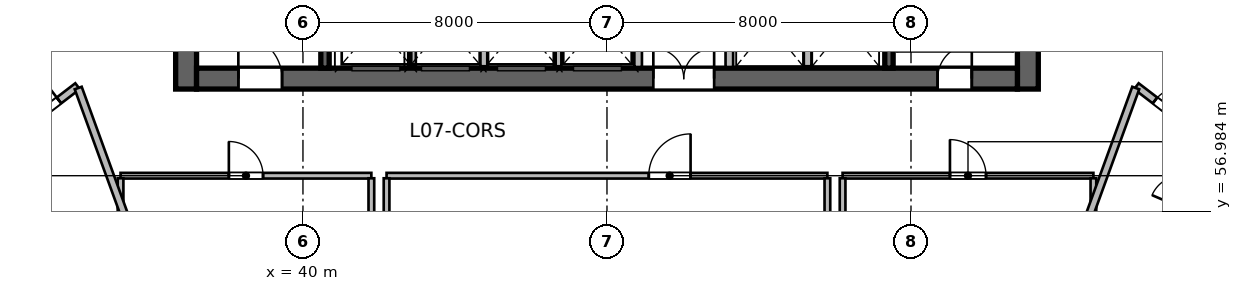
"""IFC4 building model, lengths in metres.
Left out: names, types, materials, properties, quantities, classifications, styles, units other than length and angle.
Written with IfcOpenShell. Run it as: python <this file> out.ifc"""

import sys

from ifc_helpers import new_model, si_unit, direction, frame, frame_2d, origin, place, context, subcontext, project, spatial, rectangle, extrude, source, transform, mapped, element, fill, save


model = new_model("IFC4")
c1 = context("Model", 3, precision=1e-05, world=origin(), true_north=direction((0.0, 1.0)))
c2 = subcontext(c1, "Body", "Model", "MODEL_VIEW")
j1 = project(units=[si_unit("LENGTHUNIT", "METRE"), si_unit("PLANEANGLEUNIT", "RADIAN")], contexts=[c1])
p1 = place(None, origin())
s1 = spatial("IfcSite", under=j1, at=p1, CompositionType="ELEMENT")
p2 = place(p1, origin())
s2 = spatial("IfcBuilding", under=s1, at=p2, CompositionType="ELEMENT")
p3 = place(p2, frame((0.0, 0.0, 39.0)))
s3 = spatial("IfcBuildingStorey", under=s2, at=p3, CompositionType="ELEMENT", Elevation=39.0)
m1 = source(origin(), c2, "Body", "SweptSolid", [
    extrude(rectangle(XDim=12.0, YDim=0.55, at=frame_2d((6.0, 0.0))), origin(), (0.0, 0.0, 1.0), 3.6),
])
for number, where, z_axis, x_axis in (
    (1, (36.925, 60.2, 0.0), (0.0, 0.0, 1.0), (0.0, 1.0, 0.0)),
    (2, (59.075, 60.2, 0.0), (0.0, 0.0, 1.0), (0.0, 1.0, 0.0)),
):
    element("IfcWall", number, at=place(p3, frame(where, z_axis=z_axis, x_axis=x_axis)), inside=s3, PredefinedType="SHEAR", context=c2, shape_type="MappedRepresentation", body=[
        mapped(m1, transform((0.0, 0.0, 0.0), scale=1.0)),
    ])
m2 = source(origin(), c2, "Body", "SweptSolid", [
    extrude(rectangle(XDim=21.6, YDim=0.55, at=frame_2d((10.8, 0.0))), origin(), (0.0, 0.0, 1.0), 3.6),
])
p4 = place(p3, frame((37.2, 60.475, 0.0), z_axis=(0.0, 0.0, 1.0), x_axis=(1.0, 0.0, 0.0)))
e3 = element("IfcWall", 3, at=p4, inside=s3, PredefinedType="SHEAR", context=c2, shape_type="MappedRepresentation", body=[
    mapped(m2, transform((0.0, 0.0, 0.0), scale=1.0)),
])
p5 = place(p4, frame((1.1, 0.0, 0.0)))
e4 = element("IfcOpeningElement", 4, at=p5, cuts=e3, PredefinedType="OPENING", context=c2, shape_type="SweptSolid", body=[
    extrude(rectangle(XDim=1.15, YDim=2.15, at=frame_2d((0.575, 1.075))), frame((0.0, 0.285, 0.0), z_axis=(0.0, -1.0, 0.0), x_axis=(1.0, 0.0, 0.0)), (0.0, 0.0, 1.0), 0.57),
])
p6 = place(p4, frame((19.5, 0.0, 0.0)))
e5 = element("IfcOpeningElement", 5, at=p6, cuts=e3, PredefinedType="OPENING", context=c2, shape_type="SweptSolid", body=[
    extrude(rectangle(XDim=0.9, YDim=2.1, at=frame_2d((0.45, 1.05))), frame((0.0, 0.285, 0.0), z_axis=(0.0, -1.0, 0.0), x_axis=(1.0, 0.0, 0.0)), (0.0, 0.0, 1.0), 0.57),
])
p7 = place(p4, frame((12.02, 0.0, 0.0)))
e6 = element("IfcOpeningElement", 6, at=p7, cuts=e3, PredefinedType="OPENING", context=c2, shape_type="SweptSolid", body=[
    extrude(rectangle(XDim=1.6, YDim=2.15, at=frame_2d((0.8, 1.075))), frame((0.0, 0.285, 0.0), z_axis=(0.0, -1.0, 0.0), x_axis=(1.0, 0.0, 0.0)), (0.0, 0.0, 1.0), 0.57),
])
m3 = source(origin(), c2, "Body", "SweptSolid", [
    extrude(rectangle(XDim=10.9, YDim=0.22, at=frame_2d((5.45, 0.0))), origin(), (0.0, 0.0, 1.0), 3.6),
])
p8 = place(p3, frame((40.58, 60.75, 0.0), z_axis=(0.0, 0.0, 1.0), x_axis=(0.0, 1.0, 0.0)))
e7 = element("IfcWall", 7, at=p8, inside=s3, PredefinedType="SHEAR", context=c2, shape_type="MappedRepresentation", body=[
    mapped(m3, transform((0.0, 0.0, 0.0), scale=1.0)),
])
p9 = place(p3, frame((55.42, 60.75, 0.0), z_axis=(0.0, 0.0, 1.0), x_axis=(0.0, 1.0, 0.0)))
e8 = element("IfcWall", 8, at=p9, inside=s3, PredefinedType="SHEAR", context=c2, shape_type="MappedRepresentation", body=[
    mapped(m3, transform((0.0, 0.0, 0.0), scale=1.0)),
])
p10 = place(p9, frame((9.495, 0.0, 0.0)))
e9 = element("IfcOpeningElement", 9, at=p10, cuts=e8, PredefinedType="OPENING", context=c2, shape_type="SweptSolid", body=[
    extrude(rectangle(XDim=1.15, YDim=2.15, at=frame_2d((0.575, 1.075))), frame((0.0, 0.12, 0.0), z_axis=(0.0, -1.0, 0.0), x_axis=(1.0, 0.0, 0.0)), (0.0, 0.0, 1.0), 0.24),
])
m4 = source(origin(), c2, "Body", "SweptSolid", [
    extrude(rectangle(XDim=2.24, YDim=0.2, at=frame_2d((1.12, 0.0))), origin(), (0.0, 0.0, 1.0), 3.36),
])
for number, where, z_axis, x_axis in (
    (10, (48.82, 60.78, 0.0), (0.0, 0.0, 1.0), (0.0, 1.0, 0.0)),
    (11, (51.22, 60.78, 0.0), (0.0, 0.0, 1.0), (0.0, 1.0, 0.0)),
):
    element("IfcWall", number, at=place(p3, frame(where, z_axis=z_axis, x_axis=x_axis)), inside=s3, PredefinedType="SOLIDWALL", context=c2, shape_type="MappedRepresentation", body=[
        mapped(m4, transform((0.0, 0.0, 0.0), scale=1.0)),
    ])
m5 = source(origin(), c2, "Body", "SweptSolid", [
    extrude(rectangle(XDim=2.2, YDim=0.2, at=frame_2d((1.1, 0.0))), origin(), (0.0, 0.0, 1.0), 3.36),
])
for number, where, z_axis, x_axis in (
    (12, (42.87, 60.8, 0.0), (0.0, 0.0, 1.0), (0.0, 1.0, 0.0)),
    (13, (44.77, 60.8, 0.0), (0.0, 0.0, 1.0), (0.0, 1.0, 0.0)),
    (14, (46.7, 60.8, 0.0), (0.0, 0.0, 1.0), (0.0, 1.0, 0.0)),
    (15, (53.28, 60.8, 0.0), (0.0, 0.0, 1.0), (0.0, 1.0, 0.0)),
):
    element("IfcWall", number, at=place(p3, frame(where, z_axis=z_axis, x_axis=x_axis)), inside=s3, PredefinedType="SOLIDWALL", context=c2, shape_type="MappedRepresentation", body=[
        mapped(m5, transform((0.0, 0.0, 0.0), scale=1.0)),
    ])
m6 = source(origin(), c2, "Body", "SweptSolid", [
    extrude(rectangle(XDim=6.6, YDim=0.15, at=frame_2d((3.3, 0.0))), origin(), (0.0, 0.0, 1.0), 3.36),
])
p11 = place(p3, frame((35.2, 57.92, 0.0), z_axis=(0.0, 0.0, 1.0), x_axis=(1.0, 0.0, 0.0)))
e16 = element("IfcWall", 16, at=p11, inside=s3, PredefinedType="PARTITIONING", context=c2, shape_type="MappedRepresentation", body=[
    mapped(m6, transform((0.0, 0.0, 0.0), scale=1.0)),
])
p12 = place(p11, frame((2.85, 0.0, 0.0)))
e17 = element("IfcOpeningElement", 17, at=p12, cuts=e16, PredefinedType="OPENING", context=c2, shape_type="SweptSolid", body=[
    extrude(rectangle(XDim=0.9, YDim=2.1, at=frame_2d((0.45, 1.05))), frame((0.0, 0.085, 0.0), z_axis=(0.0, -1.0, 0.0), x_axis=(1.0, 0.0, 0.0)), (0.0, 0.0, 1.0), 0.17),
])
m7 = source(origin(), c2, "Body", "SweptSolid", [
    extrude(rectangle(XDim=3.785, YDim=0.15, at=frame_2d((1.893, 0.0))), origin(), (0.0, 0.0, 1.0), 3.36),
])
for number, where, z_axis, x_axis in (
    (18, (35.2, 54.067, 0.0), (0.0, 0.0, 1.0), (0.0, 1.0, 0.0)),
    (19, (41.8, 54.067, 0.0), (0.0, 0.0, 1.0), (0.0, 1.0, 0.0)),
):
    element("IfcWall", number, at=place(p3, frame(where, z_axis=z_axis, x_axis=x_axis)), inside=s3, PredefinedType="PARTITIONING", context=c2, shape_type="MappedRepresentation", body=[
        mapped(m7, transform((0.0, 0.0, 0.0), scale=1.0)),
    ])
m8 = source(origin(), c2, "Body", "SweptSolid", [
    extrude(rectangle(XDim=11.6, YDim=0.15, at=frame_2d((5.8, 0.0))), origin(), (0.0, 0.0, 1.0), 3.36),
])
p13 = place(p3, frame((42.2, 57.92, 0.0), z_axis=(0.0, 0.0, 1.0), x_axis=(1.0, 0.0, 0.0)))
e20 = element("IfcWall", 20, at=p13, inside=s3, PredefinedType="PARTITIONING", context=c2, shape_type="MappedRepresentation", body=[
    mapped(m8, transform((0.0, 0.0, 0.0), scale=1.0)),
])
p14 = place(p13, frame((6.9, 0.0, 0.0)))
e21 = element("IfcOpeningElement", 21, at=p14, cuts=e20, PredefinedType="OPENING", context=c2, shape_type="SweptSolid", body=[
    extrude(rectangle(XDim=1.1, YDim=2.15, at=frame_2d((0.55, 1.075))), frame((0.0, 0.085, 0.0), z_axis=(0.0, -1.0, 0.0), x_axis=(1.0, 0.0, 0.0)), (0.0, 0.0, 1.0), 0.17),
])
for number, where, z_axis, x_axis in (
    (22, (42.2, 54.067, 0.0), (0.0, 0.0, 1.0), (0.0, 1.0, 0.0)),
    (23, (53.8, 54.067, 0.0), (0.0, 0.0, 1.0), (0.0, 1.0, 0.0)),
):
    element("IfcWall", number, at=place(p3, frame(where, z_axis=z_axis, x_axis=x_axis)), inside=s3, PredefinedType="PARTITIONING", context=c2, shape_type="MappedRepresentation", body=[
        mapped(m7, transform((0.0, 0.0, 0.0), scale=1.0)),
    ])
p15 = place(p3, frame((54.2, 57.92, 0.0), z_axis=(0.0, 0.0, 1.0), x_axis=(1.0, 0.0, 0.0)))
e24 = element("IfcWall", 24, at=p15, inside=s3, PredefinedType="PARTITIONING", context=c2, shape_type="MappedRepresentation", body=[
    mapped(m6, transform((0.0, 0.0, 0.0), scale=1.0)),
])
p16 = place(p15, frame((2.825, 0.0, 0.0)))
e25 = element("IfcOpeningElement", 25, at=p16, cuts=e24, PredefinedType="OPENING", context=c2, shape_type="SweptSolid", body=[
    extrude(rectangle(XDim=0.95, YDim=2.1, at=frame_2d((0.475, 1.05))), frame((0.0, 0.085, 0.0), z_axis=(0.0, -1.0, 0.0), x_axis=(1.0, 0.0, 0.0)), (0.0, 0.0, 1.0), 0.17),
])
for number, where, z_axis, x_axis in (
    (26, (54.2, 54.067, 0.0), (0.0, 0.0, 1.0), (0.0, 1.0, 0.0)),
    (27, (60.8, 54.067, 0.0), (0.0, 0.0, 1.0), (0.0, 1.0, 0.0)),
):
    element("IfcWall", number, at=place(p3, frame(where, z_axis=z_axis, x_axis=x_axis)), inside=s3, PredefinedType="PARTITIONING", context=c2, shape_type="MappedRepresentation", body=[
        mapped(m7, transform((0.0, 0.0, 0.0), scale=1.0)),
    ])
m9 = source(origin(), c2, "Body", "SweptSolid", [
    extrude(rectangle(XDim=11.844, YDim=0.195, at=frame_2d((5.922, 0.0))), origin(), (0.0, 0.0, 1.0), 2.644),
])
p17 = place(p3, frame((35.727, 46.848, 0.0), z_axis=(0.0, 0.0, 1.0), x_axis=(-0.442871152218, 0.896585267854, 0.0)))
e28 = element("IfcWall", 28, at=p17, inside=s3, PredefinedType="PARTITIONING", context=c2, shape_type="MappedRepresentation", body=[
    mapped(m9, transform((0.0, 0.0, 0.0), scale=1.0)),
])
m10 = source(origin(), c2, "Body", "SweptSolid", [
    extrude(rectangle(XDim=4.546, YDim=0.195, at=frame_2d((2.273, 0.0))), origin(), (0.0, 0.0, 1.0), 3.36),
])
p18 = place(p3, frame((30.459, 57.511, 0.0), z_axis=(0.0, 0.0, 1.0), x_axis=(0.793907931297, 0.608037989457, 0.0)))
e29 = element("IfcWall", 29, at=p18, inside=s3, PredefinedType="PARTITIONING", context=c2, shape_type="MappedRepresentation", body=[
    mapped(m10, transform((0.0, 0.0, 0.0), scale=1.0)),
])
p19 = place(p18, frame((2.98, 0.0, 0.0)))
e30 = element("IfcOpeningElement", 30, at=p19, cuts=e29, PredefinedType="OPENING", context=c2, shape_type="SweptSolid", body=[
    extrude(rectangle(XDim=0.95, YDim=2.15, at=frame_2d((0.475, 1.075))), frame((0.0, 0.107, 0.0), z_axis=(0.0, -1.0, 0.0), x_axis=(1.0, 0.0, 0.0)), (0.0, 0.0, 1.0), 0.215),
])
m11 = source(origin(), c2, "Body", "SweptSolid", [
    extrude(rectangle(XDim=12.196, YDim=0.195, at=frame_2d((6.098, 0.0))), origin(), (0.0, 0.0, 1.0), 3.36),
])
p20 = place(p3, frame((38.258, 48.766, 0.0), z_axis=(0.0, 0.0, 1.0), x_axis=(-0.342022711534, 0.939691686031, 0.0)))
e31 = element("IfcWall", 31, at=p20, inside=s3, PredefinedType="PARTITIONING", context=c2, shape_type="MappedRepresentation", body=[
    mapped(m11, transform((0.0, 0.0, 0.0), scale=1.0)),
])
p21 = place(p3, frame((61.931, 60.275, 0.0), z_axis=(0.0, 0.0, 1.0), x_axis=(0.793907931297, -0.608037989457, 0.0)))
e32 = element("IfcWall", 32, at=p21, inside=s3, PredefinedType="PARTITIONING", context=c2, shape_type="MappedRepresentation", body=[
    mapped(m10, transform((0.0, 0.0, 0.0), scale=1.0)),
])
p22 = place(p21, frame((0.616, 0.0, 0.0)))
e33 = element("IfcOpeningElement", 33, at=p22, cuts=e32, PredefinedType="OPENING", context=c2, shape_type="SweptSolid", body=[
    extrude(rectangle(XDim=0.95, YDim=2.15, at=frame_2d((0.475, 1.075))), frame((0.0, 0.107, 0.0), z_axis=(0.0, -1.0, 0.0), x_axis=(1.0, 0.0, 0.0)), (0.0, 0.0, 1.0), 0.215),
])
p23 = place(p3, frame((57.742, 48.766, 0.0), z_axis=(0.0, 0.0, 1.0), x_axis=(0.342022711534, 0.939691686031, 0.0)))
e34 = element("IfcWall", 34, at=p23, inside=s3, PredefinedType="PARTITIONING", context=c2, shape_type="MappedRepresentation", body=[
    mapped(m11, transform((0.0, 0.0, 0.0), scale=1.0)),
])
m12 = source(origin(), c2, "Body", "SweptSolid", [
    extrude(rectangle(XDim=11.844, YDim=0.195, at=frame_2d((5.922, 0.0))), origin(), (0.0, 0.0, 1.0), 3.36),
])
p24 = place(p3, frame((60.273, 46.848, 0.0), z_axis=(0.0, 0.0, 1.0), x_axis=(0.442871152218, 0.896585267854, 0.0)))
e35 = element("IfcWall", 35, at=p24, inside=s3, PredefinedType="PARTITIONING", context=c2, shape_type="MappedRepresentation", body=[
    mapped(m12, transform((0.0, 0.0, 0.0), scale=1.0)),
])
m13 = source(origin(), c2, "Body", "SweptSolid", [
    extrude(rectangle(XDim=1.15, YDim=2.15, at=frame_2d((0.575, 1.075))), frame((0.0, 0.025, 0.0), z_axis=(0.0, -1.0, 0.0), x_axis=(1.0, 0.0, 0.0)), (0.0, 0.0, 1.0), 0.05),
])
p25 = place(p5, origin())
e36 = element("IfcDoor", 36, at=p25, inside=s3, OperationType="SINGLE_SWING_LEFT", PredefinedType="DOOR", context=c2, shape_type="MappedRepresentation", body=[
    mapped(m13, transform((0.0, 0.0, 0.0), scale=1.0)),
])
fill(e4, e36)
m14 = source(origin(), c2, "Body", "SweptSolid", [
    extrude(rectangle(XDim=0.9, YDim=2.1, at=frame_2d((0.45, 1.05))), frame((0.0, 0.025, 0.0), z_axis=(0.0, -1.0, 0.0), x_axis=(1.0, 0.0, 0.0)), (0.0, 0.0, 1.0), 0.05),
])
p26 = place(p6, origin())
e37 = element("IfcDoor", 37, at=p26, inside=s3, OperationType="SINGLE_SWING_RIGHT", PredefinedType="DOOR", context=c2, shape_type="MappedRepresentation", body=[
    mapped(m14, transform((0.0, 0.0, 0.0), scale=1.0)),
])
fill(e5, e37)
m15 = source(origin(), c2, "Body", "SweptSolid", [
    extrude(rectangle(XDim=1.6, YDim=2.15, at=frame_2d((0.8, 1.075))), frame((0.0, 0.025, 0.0), z_axis=(0.0, -1.0, 0.0), x_axis=(1.0, 0.0, 0.0)), (0.0, 0.0, 1.0), 0.05),
])
p27 = place(p7, origin())
e38 = element("IfcDoor", 38, at=p27, inside=s3, OperationType="DOUBLE_DOOR_SINGLE_SWING", PredefinedType="DOOR", context=c2, shape_type="MappedRepresentation", body=[
    mapped(m15, transform((0.0, 0.0, 0.0), scale=1.0)),
])
fill(e6, e38)
p28 = place(p12, origin())
e39 = element("IfcDoor", 39, at=p28, inside=s3, OperationType="SINGLE_SWING_LEFT", PredefinedType="DOOR", context=c2, shape_type="MappedRepresentation", body=[
    mapped(m14, transform((0.0, 0.0, 0.0), scale=1.0)),
])
fill(e17, e39)
m16 = source(origin(), c2, "Body", "SweptSolid", [
    extrude(rectangle(XDim=1.1, YDim=2.15, at=frame_2d((0.55, 1.075))), frame((0.0, 0.025, 0.0), z_axis=(0.0, -1.0, 0.0), x_axis=(1.0, 0.0, 0.0)), (0.0, 0.0, 1.0), 0.05),
])
p29 = place(p14, origin())
e40 = element("IfcDoor", 40, at=p29, inside=s3, OperationType="SINGLE_SWING_RIGHT", PredefinedType="DOOR", context=c2, shape_type="MappedRepresentation", body=[
    mapped(m16, transform((0.0, 0.0, 0.0), scale=1.0)),
])
fill(e21, e40)
m17 = source(origin(), c2, "Body", "SweptSolid", [
    extrude(rectangle(XDim=0.95, YDim=2.1, at=frame_2d((0.475, 1.05))), frame((0.0, 0.025, 0.0), z_axis=(0.0, -1.0, 0.0), x_axis=(1.0, 0.0, 0.0)), (0.0, 0.0, 1.0), 0.05),
])
p30 = place(p16, origin())
e41 = element("IfcDoor", 41, at=p30, inside=s3, OperationType="SINGLE_SWING_LEFT", PredefinedType="DOOR", context=c2, shape_type="MappedRepresentation", body=[
    mapped(m17, transform((0.0, 0.0, 0.0), scale=1.0)),
])
fill(e25, e41)
m18 = source(origin(), c2, "Body", "SweptSolid", [
    extrude(rectangle(XDim=0.95, YDim=2.15, at=frame_2d((0.475, 1.075))), frame((0.0, 0.025, 0.0), z_axis=(0.0, -1.0, 0.0), x_axis=(1.0, 0.0, 0.0)), (0.0, 0.0, 1.0), 0.05),
])
p31 = place(p19, origin())
e42 = element("IfcDoor", 42, at=p31, inside=s3, OperationType="SINGLE_SWING_RIGHT", PredefinedType="DOOR", context=c2, shape_type="MappedRepresentation", body=[
    mapped(m18, transform((0.0, 0.0, 0.0), scale=1.0)),
])
fill(e30, e42)
p32 = place(p22, origin())
e43 = element("IfcDoor", 43, at=p32, inside=s3, OperationType="SINGLE_SWING_RIGHT", PredefinedType="DOOR", context=c2, shape_type="MappedRepresentation", body=[
    mapped(m18, transform((0.0, 0.0, 0.0), scale=1.0)),
])
fill(e33, e43)
save(model, sys.argv[1])
